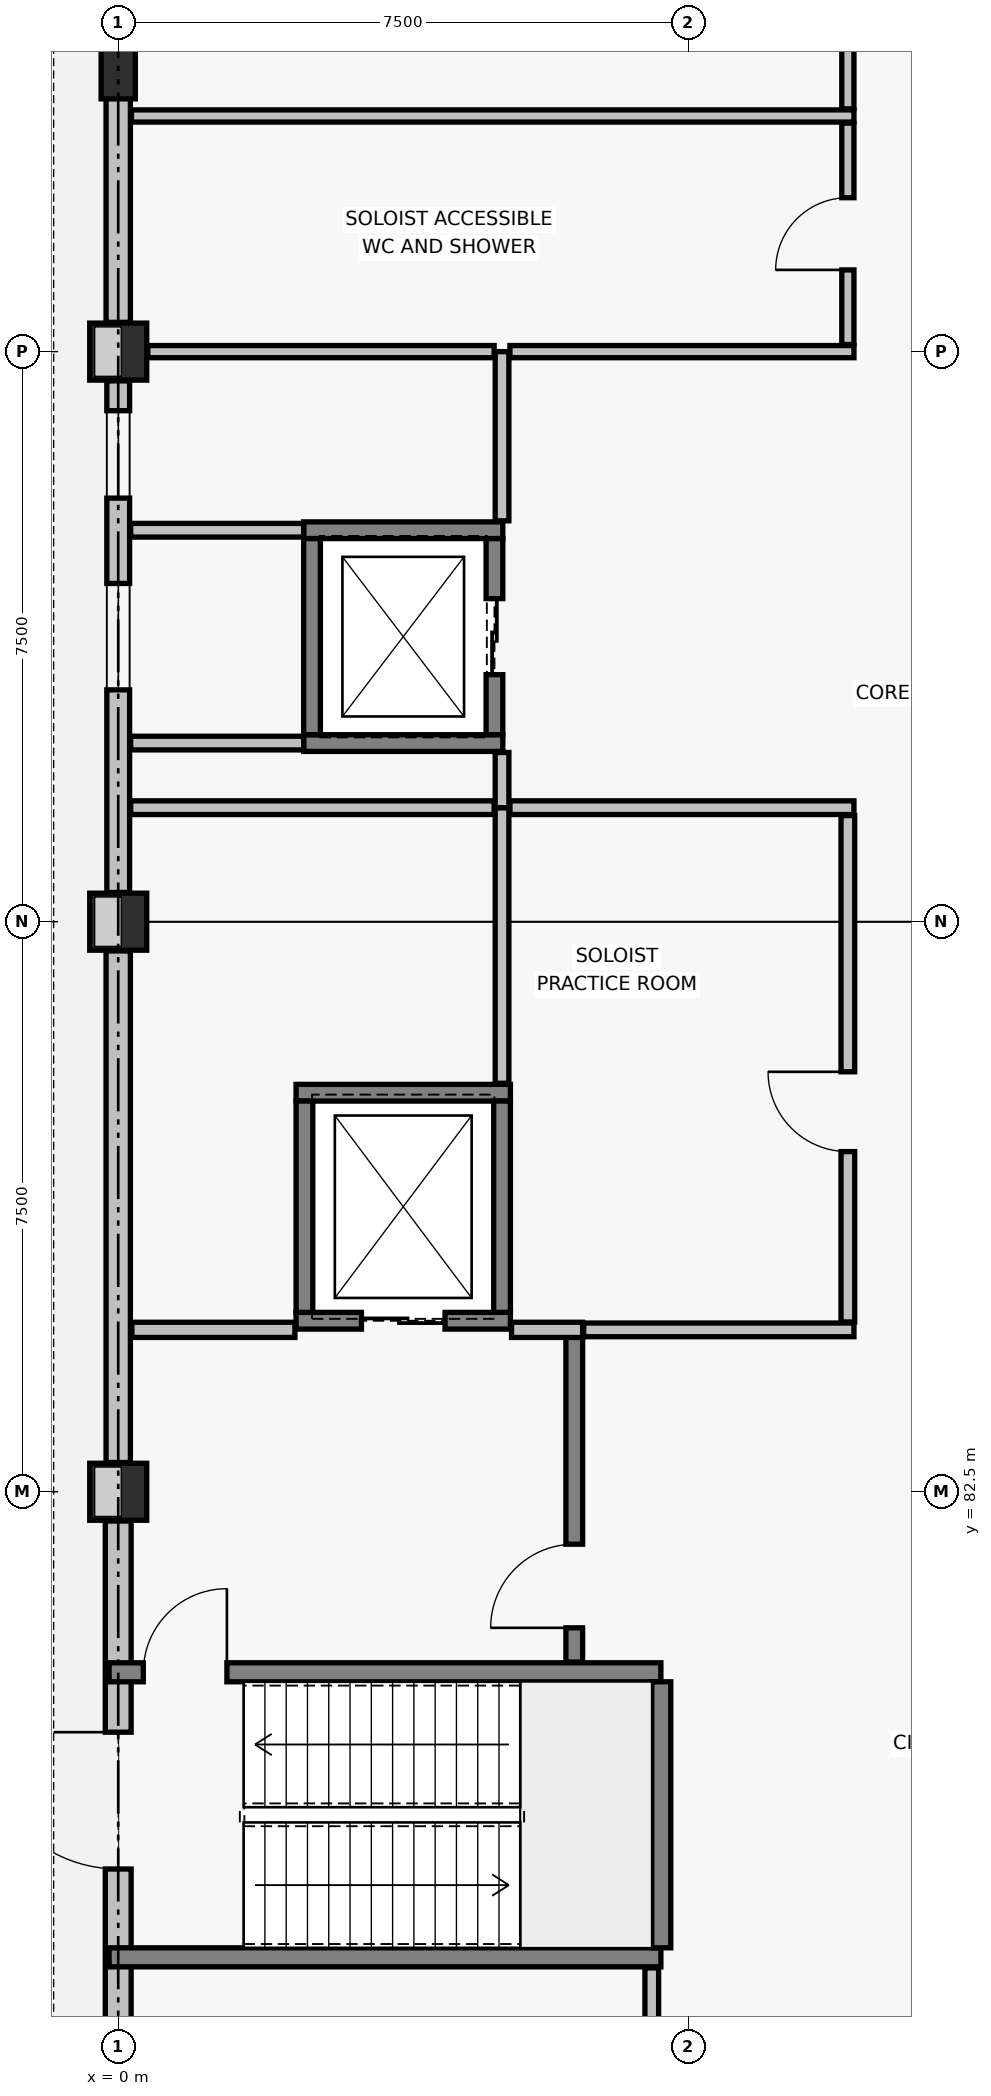
"""IFC4 building model, lengths in metres.
Left out: names, types, materials, properties, quantities, classifications, styles, units other than length and angle.
Written with IfcOpenShell. Run it as: python <this file> out.ifc"""

import sys

from ifc_helpers import new_model, si_unit, direction, frame, frame_2d, origin, origin_2d, place, context, subcontext, project, spatial, rectangle, extrude, element, fill, save


model = new_model("IFC4")
c1 = context("Model", 3, precision=1e-05, world=origin(), true_north=direction((0.0, 1.0)))
c2 = subcontext(c1, "Body", "Model", "MODEL_VIEW")
j1 = project(units=[si_unit("LENGTHUNIT", "METRE"), si_unit("PLANEANGLEUNIT", "RADIAN")], contexts=[c1])
p1 = place(None, origin())
s1 = spatial("IfcSite", under=j1, at=p1, CompositionType="ELEMENT")
p2 = place(p1, origin())
s2 = spatial("IfcBuilding", under=s1, at=p2, CompositionType="ELEMENT")
p3 = place(p2, origin())
s3 = spatial("IfcBuildingStorey", under=s2, at=p3, CompositionType="ELEMENT", Elevation=0.0)
for number, where, z_axis, x_axis in (
    (1, (0.0, 82.5, 0.0), (0.0, 0.0, 1.0), (1.0, 0.0, 0.0)),
    (2, (0.0, 90.0, 0.0), (0.0, 0.0, 1.0), (1.0, 0.0, 0.0)),
    (3, (0.0, 97.5, 0.0), (0.0, 0.0, 1.0), (1.0, 0.0, 0.0)),
):
    element("IfcColumn", number, at=place(p3, frame(where, z_axis=z_axis, x_axis=x_axis)), inside=s3, PredefinedType="COLUMN", context=c2, shape_type="SweptSolid", body=[
        extrude(rectangle(XDim=0.75, YDim=0.75, at=origin_2d()), origin(), (0.0, 0.0, 1.0), 4.8),
    ])
p4 = place(p3, frame((0.0, 101.25, 0.0), z_axis=(0.0, 0.0, 1.0), x_axis=(1.0, 0.0, 0.0)))
e4 = element("IfcColumn", 4, at=p4, inside=s3, PredefinedType="PILASTER", context=c2, shape_type="SweptSolid", body=[
    extrude(rectangle(XDim=0.45, YDim=0.85, at=origin_2d()), origin(), (0.0, 0.0, 1.0), 4.8),
])
p5 = place(p3, frame((0.0, 75.385, 0.0), z_axis=(0.0, 0.0, 1.0), x_axis=(0.0, 1.0, 0.0)))
e5 = element("IfcWall", 5, at=p5, inside=s3, PredefinedType="SOLIDWALL", context=c2, shape_type="SweptSolid", body=[
    extrude(rectangle(XDim=6.73, YDim=0.34, at=frame_2d((3.365, 0.0))), origin(), (0.0, 0.0, 1.0), 2.97),
])
p6 = place(p5, frame((2.152, 0.0, 0.0)))
e6 = element("IfcOpeningElement", 6, at=p6, cuts=e5, PredefinedType="OPENING", context=c2, shape_type="SweptSolid", body=[
    extrude(rectangle(XDim=1.8, YDim=2.2, at=frame_2d((0.9, 1.1))), frame((0.0, 0.18, 0.0), z_axis=(0.0, -1.0, 0.0), x_axis=(1.0, 0.0, 0.0)), (0.0, 0.0, 1.0), 0.36),
])
p7 = place(p3, frame((0.0, 82.885, 0.0), z_axis=(0.0, 0.0, 1.0), x_axis=(0.0, 1.0, 0.0)))
e7 = element("IfcWall", 7, at=p7, inside=s3, PredefinedType="SOLIDWALL", context=c2, shape_type="SweptSolid", body=[
    extrude(rectangle(XDim=6.73, YDim=0.32, at=frame_2d((3.365, 0.0))), origin(), (0.0, 0.0, 1.0), 2.97),
])
p8 = place(p3, frame((0.0, 90.385, 0.0), z_axis=(0.0, 0.0, 1.0), x_axis=(0.0, 1.0, 0.0)))
e8 = element("IfcWall", 8, at=p8, inside=s3, PredefinedType="SOLIDWALL", context=c2, shape_type="SweptSolid", body=[
    extrude(rectangle(XDim=6.73, YDim=0.3, at=frame_2d((3.365, 0.0))), origin(), (0.0, 0.0, 1.0), 2.97),
])
p9 = place(p8, frame((2.665, 0.0, 0.6)))
e9 = element("IfcOpeningElement", 9, at=p9, cuts=e8, PredefinedType="OPENING", context=c2, shape_type="SweptSolid", body=[
    extrude(rectangle(XDim=1.4, YDim=1.8, at=frame_2d((0.7, 0.9))), frame((0.0, 0.16, 0.0), z_axis=(0.0, -1.0, 0.0), x_axis=(1.0, 0.0, 0.0)), (0.0, 0.0, 1.0), 0.32),
])
p10 = place(p8, frame((5.188, 0.0, 0.6)))
e10 = element("IfcOpeningElement", 10, at=p10, cuts=e8, PredefinedType="OPENING", context=c2, shape_type="SweptSolid", body=[
    extrude(rectangle(XDim=1.15, YDim=1.3, at=frame_2d((0.575, 0.65))), frame((0.0, 0.16, 0.0), z_axis=(0.0, -1.0, 0.0), x_axis=(1.0, 0.0, 0.0)), (0.0, 0.0, 1.0), 0.32),
])
p11 = place(p3, frame((0.0, 97.885, 0.0), z_axis=(0.0, 0.0, 1.0), x_axis=(0.0, 1.0, 0.0)))
e11 = element("IfcWall", 11, at=p11, inside=s3, PredefinedType="SOLIDWALL", context=c2, shape_type="SweptSolid", body=[
    extrude(rectangle(XDim=6.73, YDim=0.32, at=frame_2d((3.365, 0.0))), origin(), (0.0, 0.0, 1.0), 2.97),
])
p12 = place(p3, frame((-0.12, 76.375, 0.0), z_axis=(0.0, 0.0, 1.0), x_axis=(1.0, 0.0, 0.0)))
e12 = element("IfcWall", 12, at=p12, inside=s3, PredefinedType="SOLIDWALL", context=c2, shape_type="SweptSolid", body=[
    extrude(rectangle(XDim=7.26, YDim=0.25, at=frame_2d((3.63, 0.0))), origin(), (0.0, 0.0, 1.0), 4.5),
])
p13 = place(p3, frame((-0.12, 80.125, 0.0), z_axis=(0.0, 0.0, 1.0), x_axis=(1.0, 0.0, 0.0)))
e13 = element("IfcWall", 13, at=p13, inside=s3, PredefinedType="SOLIDWALL", context=c2, shape_type="SweptSolid", body=[
    extrude(rectangle(XDim=7.26, YDim=0.25, at=frame_2d((3.63, 0.0))), origin(), (0.0, 0.0, 1.0), 4.5),
])
p14 = place(p13, frame((0.45, 0.0, 0.0)))
e14 = element("IfcOpeningElement", 14, at=p14, cuts=e13, PredefinedType="OPENING", context=c2, shape_type="SweptSolid", body=[
    extrude(rectangle(XDim=1.1, YDim=2.15, at=frame_2d((0.55, 1.075))), frame((0.0, 0.135, 0.0), z_axis=(0.0, -1.0, 0.0), x_axis=(1.0, 0.0, 0.0)), (0.0, 0.0, 1.0), 0.27),
])
p15 = place(p3, frame((7.145, 76.5, 0.0), z_axis=(0.0, 0.0, 1.0), x_axis=(0.0, 1.0, 0.0)))
e15 = element("IfcWall", 15, at=p15, inside=s3, PredefinedType="SOLIDWALL", context=c2, shape_type="SweptSolid", body=[
    extrude(rectangle(XDim=3.5, YDim=0.25, at=frame_2d((1.75, 0.0))), origin(), (0.0, 0.0, 1.0), 4.5),
])
for number, where, z_axis, x_axis in (
    (16, (2.44, 92.35, 0.0), (0.0, 0.0, 1.0), (1.0, 0.0, 0.0)),
    (17, (2.44, 95.15, 0.0), (0.0, 0.0, 1.0), (1.0, 0.0, 0.0)),
):
    element("IfcWall", number, at=place(p3, frame(where, z_axis=z_axis, x_axis=x_axis)), inside=s3, PredefinedType="SOLIDWALL", context=c2, shape_type="SweptSolid", body=[
        extrude(rectangle(XDim=2.62, YDim=0.22, at=frame_2d((1.31, 0.0))), origin(), (0.0, 0.0, 1.0), 4.5),
    ])
p16 = place(p3, frame((2.55, 92.46, 0.0), z_axis=(0.0, 0.0, 1.0), x_axis=(0.0, 1.0, 0.0)))
e18 = element("IfcWall", 18, at=p16, inside=s3, PredefinedType="SOLIDWALL", context=c2, shape_type="SweptSolid", body=[
    extrude(rectangle(XDim=2.58, YDim=0.22, at=frame_2d((1.29, 0.0))), origin(), (0.0, 0.0, 1.0), 4.5),
])
p17 = place(p3, frame((4.95, 92.46, 0.0), z_axis=(0.0, 0.0, 1.0), x_axis=(0.0, 1.0, 0.0)))
e19 = element("IfcWall", 19, at=p17, inside=s3, PredefinedType="SOLIDWALL", context=c2, shape_type="SweptSolid", body=[
    extrude(rectangle(XDim=2.58, YDim=0.22, at=frame_2d((1.29, 0.0))), origin(), (0.0, 0.0, 1.0), 4.5),
])
p18 = place(p17, frame((0.79, 0.0, 0.0)))
e20 = element("IfcOpeningElement", 20, at=p18, cuts=e19, PredefinedType="OPENING", context=c2, shape_type="SweptSolid", body=[
    extrude(rectangle(XDim=1.0, YDim=2.15, at=frame_2d((0.5, 1.075))), frame((0.0, 0.12, 0.0), z_axis=(0.0, -1.0, 0.0), x_axis=(1.0, 0.0, 0.0)), (0.0, 0.0, 1.0), 0.24),
])
p19 = place(p3, frame((2.34, 84.75, 0.0), z_axis=(0.0, 0.0, 1.0), x_axis=(1.0, 0.0, 0.0)))
e21 = element("IfcWall", 21, at=p19, inside=s3, PredefinedType="SOLIDWALL", context=c2, shape_type="SweptSolid", body=[
    extrude(rectangle(XDim=2.82, YDim=0.22, at=frame_2d((1.41, 0.0))), origin(), (0.0, 0.0, 1.0), 4.5),
])
p20 = place(p19, frame((0.86, 0.0, 0.0)))
e22 = element("IfcOpeningElement", 22, at=p20, cuts=e21, PredefinedType="OPENING", context=c2, shape_type="SweptSolid", body=[
    extrude(rectangle(XDim=1.1, YDim=2.15, at=frame_2d((0.55, 1.075))), frame((0.0, 0.12, 0.0), z_axis=(0.0, -1.0, 0.0), x_axis=(1.0, 0.0, 0.0)), (0.0, 0.0, 1.0), 0.24),
])
p21 = place(p3, frame((2.34, 87.75, 0.0), z_axis=(0.0, 0.0, 1.0), x_axis=(1.0, 0.0, 0.0)))
e23 = element("IfcWall", 23, at=p21, inside=s3, PredefinedType="SOLIDWALL", context=c2, shape_type="SweptSolid", body=[
    extrude(rectangle(XDim=2.82, YDim=0.22, at=frame_2d((1.41, 0.0))), origin(), (0.0, 0.0, 1.0), 4.5),
])
for number, where, z_axis, x_axis in (
    (24, (2.45, 84.86, 0.0), (0.0, 0.0, 1.0), (0.0, 1.0, 0.0)),
    (25, (5.05, 84.86, 0.0), (0.0, 0.0, 1.0), (0.0, 1.0, 0.0)),
):
    element("IfcWall", number, at=place(p3, frame(where, z_axis=z_axis, x_axis=x_axis)), inside=s3, PredefinedType="SOLIDWALL", context=c2, shape_type="SweptSolid", body=[
        extrude(rectangle(XDim=2.78, YDim=0.22, at=frame_2d((1.39, 0.0))), origin(), (0.0, 0.0, 1.0), 4.5),
    ])
p22 = place(p3, frame((6.0, 80.26, 0.0), z_axis=(0.0, 0.0, 1.0), x_axis=(0.0, 1.0, 0.0)))
e26 = element("IfcWall", 26, at=p22, inside=s3, PredefinedType="SOLIDWALL", context=c2, shape_type="SweptSolid", body=[
    extrude(rectangle(XDim=4.37, YDim=0.22, at=frame_2d((2.185, 0.0))), origin(), (0.0, 0.0, 1.0), 4.5),
])
p23 = place(p22, frame((0.45, 0.0, 0.0)))
e27 = element("IfcOpeningElement", 27, at=p23, cuts=e26, PredefinedType="OPENING", context=c2, shape_type="SweptSolid", body=[
    extrude(rectangle(XDim=1.1, YDim=2.15, at=frame_2d((0.55, 1.075))), frame((0.0, 0.12, 0.0), z_axis=(0.0, -1.0, 0.0), x_axis=(1.0, 0.0, 0.0)), (0.0, 0.0, 1.0), 0.24),
])
p24 = place(p3, frame((0.18, 84.63, 0.0), z_axis=(0.0, 0.0, 1.0), x_axis=(1.0, 0.0, 0.0)))
e28 = element("IfcWall", 28, at=p24, inside=s3, PredefinedType="PARTITIONING", context=c2, shape_type="SweptSolid", body=[
    extrude(rectangle(XDim=2.145, YDim=0.2, at=frame_2d((1.073, 0.0))), origin(), (0.0, 0.0, 1.0), 3.88),
])
p25 = place(p3, frame((5.175, 84.63, 0.0), z_axis=(0.0, 0.0, 1.0), x_axis=(1.0, 0.0, 0.0)))
e29 = element("IfcWall", 29, at=p25, inside=s3, PredefinedType="PARTITIONING", context=c2, shape_type="SweptSolid", body=[
    extrude(rectangle(XDim=0.935, YDim=0.2, at=frame_2d((0.468, 0.0))), origin(), (0.0, 0.0, 1.0), 4.08),
])
p26 = place(p3, frame((7.02, 75.0, 0.0), z_axis=(0.0, 0.0, 1.0), x_axis=(0.0, 1.0, 0.0)))
e30 = element("IfcWall", 30, at=p26, inside=s3, PredefinedType="PARTITIONING", context=c2, shape_type="SweptSolid", body=[
    extrude(rectangle(XDim=1.236, YDim=0.18, at=frame_2d((0.618, 0.0))), origin(), (0.0, 0.0, 1.0), 2.97),
])
p27 = place(p3, frame((5.05, 87.874, 0.0), z_axis=(0.0, 0.0, 1.0), x_axis=(0.0, 1.0, 0.0)))
e31 = element("IfcWall", 31, at=p27, inside=s3, PredefinedType="PARTITIONING", context=c2, shape_type="SweptSolid", body=[
    extrude(rectangle(XDim=3.626, YDim=0.18, at=frame_2d((1.813, 0.0))), origin(), (0.0, 0.0, 1.0), 2.97),
])
p28 = place(p3, frame((6.124, 84.63, 0.0), z_axis=(0.0, 0.0, 1.0), x_axis=(1.0, 0.0, 0.0)))
e32 = element("IfcWall", 32, at=p28, inside=s3, PredefinedType="PARTITIONING", context=c2, shape_type="SweptSolid", body=[
    extrude(rectangle(XDim=3.556, YDim=0.18, at=frame_2d((1.778, 0.0))), origin(), (0.0, 0.0, 1.0), 3.87),
])
p29 = place(p3, frame((0.164, 91.5, 0.0), z_axis=(0.0, 0.0, 1.0), x_axis=(1.0, 0.0, 0.0)))
e33 = element("IfcWall", 33, at=p29, inside=s3, PredefinedType="PARTITIONING", context=c2, shape_type="SweptSolid", body=[
    extrude(rectangle(XDim=4.782, YDim=0.18, at=frame_2d((2.391, 0.0))), origin(), (0.0, 0.0, 1.0), 3.72),
])
p30 = place(p3, frame((5.154, 91.5, 0.0), z_axis=(0.0, 0.0, 1.0), x_axis=(1.0, 0.0, 0.0)))
e34 = element("IfcWall", 34, at=p30, inside=s3, PredefinedType="PARTITIONING", context=c2, shape_type="SweptSolid", body=[
    extrude(rectangle(XDim=4.526, YDim=0.18, at=frame_2d((2.263, 0.0))), origin(), (0.0, 0.0, 1.0), 3.87),
])
p31 = place(p3, frame((9.6, 84.734, 0.0), z_axis=(0.0, 0.0, 1.0), x_axis=(0.0, 1.0, 0.0)))
e35 = element("IfcWall", 35, at=p31, inside=s3, PredefinedType="PARTITIONING", context=c2, shape_type="SweptSolid", body=[
    extrude(rectangle(XDim=6.662, YDim=0.18, at=frame_2d((3.331, 0.0))), origin(), (0.0, 0.0, 1.0), 2.97),
])
p32 = place(p31, frame((2.241, 0.0, 0.0)))
e36 = element("IfcOpeningElement", 36, at=p32, cuts=e35, PredefinedType="OPENING", context=c2, shape_type="SweptSolid", body=[
    extrude(rectangle(XDim=1.05, YDim=2.12, at=frame_2d((0.525, 1.06))), frame((0.0, 0.1, 0.0), z_axis=(0.0, -1.0, 0.0), x_axis=(1.0, 0.0, 0.0)), (0.0, 0.0, 1.0), 0.2),
])
for number, where, z_axis, x_axis in (
    (37, (0.164, 92.35, 0.0), (0.0, 0.0, 1.0), (1.0, 0.0, 0.0)),
    (38, (0.164, 95.15, 0.0), (0.0, 0.0, 1.0), (1.0, 0.0, 0.0)),
):
    element("IfcWall", number, at=place(p3, frame(where, z_axis=z_axis, x_axis=x_axis)), inside=s3, PredefinedType="PARTITIONING", context=c2, shape_type="SweptSolid", body=[
        extrude(rectangle(XDim=2.276, YDim=0.18, at=frame_2d((1.138, 0.0))), origin(), (0.0, 0.0, 1.0), 3.72),
    ])
p33 = place(p3, frame((5.05, 91.5, 0.0), z_axis=(0.0, 0.0, 1.0), x_axis=(0.0, 1.0, 0.0)))
e39 = element("IfcWall", 39, at=p33, inside=s3, PredefinedType="PARTITIONING", context=c2, shape_type="SweptSolid", body=[
    extrude(rectangle(XDim=0.726, YDim=0.18, at=frame_2d((0.363, 0.0))), origin(), (0.0, 0.0, 1.0), 3.87),
])
p34 = place(p3, frame((5.05, 95.274, 0.0), z_axis=(0.0, 0.0, 1.0), x_axis=(0.0, 1.0, 0.0)))
e40 = element("IfcWall", 40, at=p34, inside=s3, PredefinedType="PARTITIONING", context=c2, shape_type="SweptSolid", body=[
    extrude(rectangle(XDim=2.226, YDim=0.18, at=frame_2d((1.113, 0.0))), origin(), (0.0, 0.0, 1.0), 2.97),
])
p35 = place(p3, frame((0.389, 97.5, 0.0), z_axis=(0.0, 0.0, 1.0), x_axis=(1.0, 0.0, 0.0)))
e41 = element("IfcWall", 41, at=p35, inside=s3, PredefinedType="PARTITIONING", context=c2, shape_type="SweptSolid", body=[
    extrude(rectangle(XDim=4.557, YDim=0.16, at=frame_2d((2.279, 0.0))), origin(), (0.0, 0.0, 1.0), 2.97),
])
p36 = place(p3, frame((5.154, 97.5, 0.0), z_axis=(0.0, 0.0, 1.0), x_axis=(1.0, 0.0, 0.0)))
e42 = element("IfcWall", 42, at=p36, inside=s3, PredefinedType="PARTITIONING", context=c2, shape_type="SweptSolid", body=[
    extrude(rectangle(XDim=4.526, YDim=0.16, at=frame_2d((2.263, 0.0))), origin(), (0.0, 0.0, 1.0), 2.97),
])
p37 = place(p3, frame((0.174, 100.6, 0.0), z_axis=(0.0, 0.0, 1.0), x_axis=(1.0, 0.0, 0.0)))
e43 = element("IfcWall", 43, at=p37, inside=s3, PredefinedType="PARTITIONING", context=c2, shape_type="SweptSolid", body=[
    extrude(rectangle(XDim=9.506, YDim=0.16, at=frame_2d((4.753, 0.0))), origin(), (0.0, 0.0, 1.0), 3.72),
])
p38 = place(p3, frame((9.6, 97.594, 0.0), z_axis=(0.0, 0.0, 1.0), x_axis=(0.0, 1.0, 0.0)))
e44 = element("IfcWall", 44, at=p38, inside=s3, PredefinedType="PARTITIONING", context=c2, shape_type="SweptSolid", body=[
    extrude(rectangle(XDim=2.912, YDim=0.16, at=frame_2d((1.456, 0.0))), origin(), (0.0, 0.0, 1.0), 2.97),
])
p39 = place(p38, frame((0.981, 0.0, 0.0)))
e45 = element("IfcOpeningElement", 45, at=p39, cuts=e44, PredefinedType="OPENING", context=c2, shape_type="SweptSolid", body=[
    extrude(rectangle(XDim=0.95, YDim=2.1, at=frame_2d((0.475, 1.05))), frame((0.0, 0.09, 0.0), z_axis=(0.0, -1.0, 0.0), x_axis=(1.0, 0.0, 0.0)), (0.0, 0.0, 1.0), 0.18),
])
p40 = place(p3, frame((9.6, 100.694, 0.0), z_axis=(0.0, 0.0, 1.0), x_axis=(0.0, 1.0, 0.0)))
e46 = element("IfcWall", 46, at=p40, inside=s3, PredefinedType="PARTITIONING", context=c2, shape_type="SweptSolid", body=[
    extrude(rectangle(XDim=11.642, YDim=0.16, at=frame_2d((5.821, 0.0))), origin(), (0.0, 0.0, 1.0), 2.97),
])
p41 = place(p40, frame((5.281, 0.0, 0.0)))
e47 = element("IfcOpeningElement", 47, at=p41, cuts=e46, PredefinedType="OPENING", context=c2, shape_type="SweptSolid", body=[
    extrude(rectangle(XDim=1.05, YDim=2.12, at=frame_2d((0.525, 1.06))), frame((0.0, 0.09, 0.0), z_axis=(0.0, -1.0, 0.0), x_axis=(1.0, 0.0, 0.0)), (0.0, 0.0, 1.0), 0.18),
])
p42 = place(p6, origin())
e48 = element("IfcDoor", 48, at=p42, inside=s3, OperationType="SINGLE_SWING_RIGHT", PredefinedType="DOOR", context=c2, shape_type="SweptSolid", body=[
    extrude(rectangle(XDim=1.8, YDim=2.2, at=frame_2d((0.9, 1.1))), frame((0.0, 0.025, 0.0), z_axis=(0.0, -1.0, 0.0), x_axis=(1.0, 0.0, 0.0)), (0.0, 0.0, 1.0), 0.05),
])
fill(e6, e48)
p43 = place(p9, origin())
e49 = element("IfcWindow", 49, at=p43, inside=s3, PartitioningType="SINGLE_PANEL", PredefinedType="WINDOW", context=c2, shape_type="SweptSolid", body=[
    extrude(rectangle(XDim=1.4, YDim=1.8, at=frame_2d((0.7, 0.9))), frame((0.0, 0.03, 0.0), z_axis=(0.0, -1.0, 0.0), x_axis=(1.0, 0.0, 0.0)), (0.0, 0.0, 1.0), 0.06),
])
fill(e9, e49)
p44 = place(p10, origin())
e50 = element("IfcWindow", 50, at=p44, inside=s3, PartitioningType="SINGLE_PANEL", PredefinedType="WINDOW", context=c2, shape_type="SweptSolid", body=[
    extrude(rectangle(XDim=1.15, YDim=1.3, at=frame_2d((0.575, 0.65))), frame((0.0, 0.03, 0.0), z_axis=(0.0, -1.0, 0.0), x_axis=(1.0, 0.0, 0.0)), (0.0, 0.0, 1.0), 0.06),
])
fill(e10, e50)
p45 = place(p14, origin())
e51 = element("IfcDoor", 51, at=p45, inside=s3, OperationType="SINGLE_SWING_RIGHT", PredefinedType="DOOR", context=c2, shape_type="SweptSolid", body=[
    extrude(rectangle(XDim=1.1, YDim=2.15, at=frame_2d((0.55, 1.075))), frame((0.0, 0.025, 0.0), z_axis=(0.0, -1.0, 0.0), x_axis=(1.0, 0.0, 0.0)), (0.0, 0.0, 1.0), 0.05),
])
fill(e14, e51)
p46 = place(p18, origin())
e52 = element("IfcDoor", 52, at=p46, inside=s3, OperationType="SLIDING_TO_LEFT", PredefinedType="DOOR", context=c2, shape_type="SweptSolid", body=[
    extrude(rectangle(XDim=1.0, YDim=2.15, at=frame_2d((0.5, 1.075))), frame((0.0, 0.025, 0.0), z_axis=(0.0, -1.0, 0.0), x_axis=(1.0, 0.0, 0.0)), (0.0, 0.0, 1.0), 0.05),
])
fill(e20, e52)
p47 = place(p20, origin())
e53 = element("IfcDoor", 53, at=p47, inside=s3, OperationType="SLIDING_TO_LEFT", PredefinedType="DOOR", context=c2, shape_type="SweptSolid", body=[
    extrude(rectangle(XDim=1.1, YDim=2.15, at=frame_2d((0.55, 1.075))), frame((0.0, 0.025, 0.0), z_axis=(0.0, -1.0, 0.0), x_axis=(1.0, 0.0, 0.0)), (0.0, 0.0, 1.0), 0.05),
])
fill(e22, e53)
p48 = place(p23, origin())
e54 = element("IfcDoor", 54, at=p48, inside=s3, OperationType="SINGLE_SWING_LEFT", PredefinedType="DOOR", context=c2, shape_type="SweptSolid", body=[
    extrude(rectangle(XDim=1.1, YDim=2.15, at=frame_2d((0.55, 1.075))), frame((0.0, 0.025, 0.0), z_axis=(0.0, -1.0, 0.0), x_axis=(1.0, 0.0, 0.0)), (0.0, 0.0, 1.0), 0.05),
])
fill(e27, e54)
p49 = place(p32, origin())
e55 = element("IfcDoor", 55, at=p49, inside=s3, OperationType="SINGLE_SWING_RIGHT", PredefinedType="DOOR", context=c2, shape_type="SweptSolid", body=[
    extrude(rectangle(XDim=1.05, YDim=2.12, at=frame_2d((0.525, 1.06))), frame((0.0, 0.025, 0.0), z_axis=(0.0, -1.0, 0.0), x_axis=(1.0, 0.0, 0.0)), (0.0, 0.0, 1.0), 0.05),
])
fill(e36, e55)
p50 = place(p39, origin())
e56 = element("IfcDoor", 56, at=p50, inside=s3, OperationType="SINGLE_SWING_LEFT", PredefinedType="DOOR", context=c2, shape_type="SweptSolid", body=[
    extrude(rectangle(XDim=0.95, YDim=2.1, at=frame_2d((0.475, 1.05))), frame((0.0, 0.025, 0.0), z_axis=(0.0, -1.0, 0.0), x_axis=(1.0, 0.0, 0.0)), (0.0, 0.0, 1.0), 0.05),
])
fill(e45, e56)
save(model, sys.argv[1])
